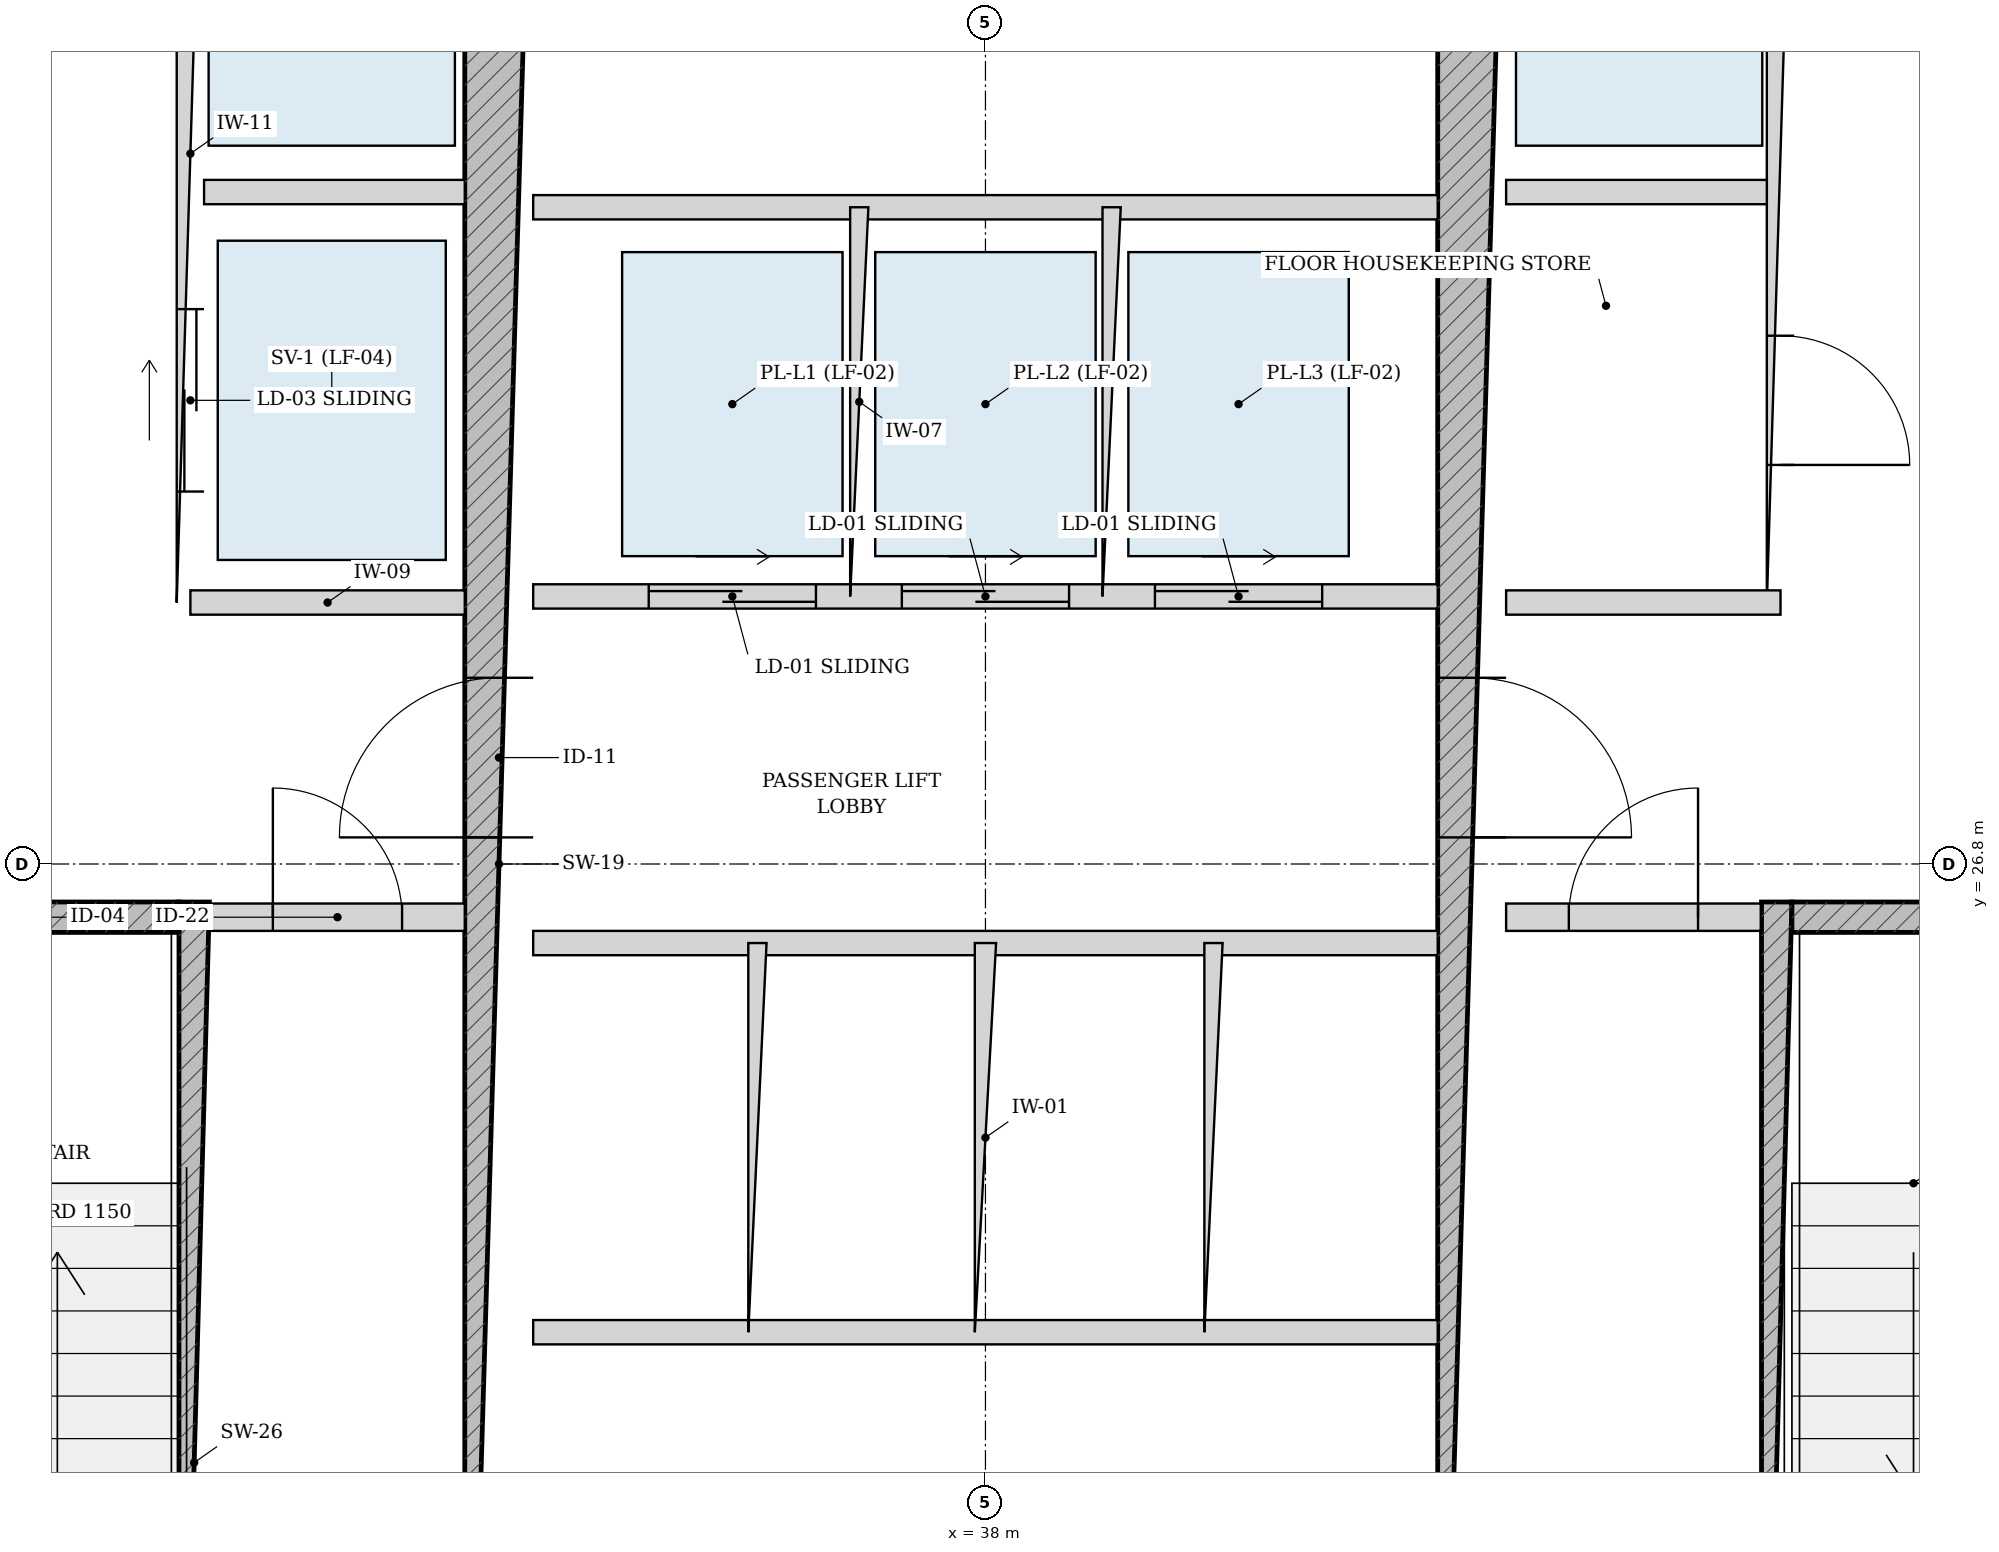
"""IFC4 building model, lengths in metres.
Left out: names, types, materials, properties, quantities, classifications, styles, units other than length and angle.
Written with IfcOpenShell. Run it as: python <this file> out.ifc"""

import sys

from ifc_helpers import new_model, si_unit, direction, frame, frame_2d, origin, place, context, subcontext, project, spatial, rectangle, extrude, source, transform, mapped, element, fill, save


model = new_model("IFC4")
c1 = context("Model", 3, precision=1e-05, world=origin(), true_north=direction((-0.2419218956, 0.970295726276)))
c2 = subcontext(c1, "Body", "Model", "MODEL_VIEW")
j1 = project(units=[si_unit("LENGTHUNIT", "METRE"), si_unit("PLANEANGLEUNIT", "RADIAN")], contexts=[c1])
p1 = place(None, origin())
s1 = spatial("IfcSite", under=j1, at=p1, CompositionType="ELEMENT")
p2 = place(p1, origin())
s2 = spatial("IfcBuilding", under=s1, at=p2, CompositionType="ELEMENT")
p3 = place(p2, frame((0.0, 0.0, 123.0)))
s3 = spatial("IfcBuildingStorey", under=s2, at=p3, CompositionType="ELEMENT", Elevation=123.0)
p4 = place(p3, frame((32.795, 19.175, 0.0), z_axis=(0.0, 0.0, 1.0), x_axis=(0.0, 1.0, 0.0)))
e1 = element("IfcWall", 1, at=p4, inside=s3, PredefinedType="SOLIDWALL", context=c2, shape_type="SweptSolid", body=[
    extrude(rectangle(XDim=7.375, YDim=0.2, at=frame_2d((3.688, 0.0))), origin(), (0.0, 0.0, 1.0), 3.325),
])
p5 = place(p3, frame((29.375, 26.45, 0.0), z_axis=(0.0, 0.0, 1.0), x_axis=(1.0, 0.0, 0.0)))
e2 = element("IfcWall", 2, at=p5, inside=s3, PredefinedType="SOLIDWALL", context=c2, shape_type="SweptSolid", body=[
    extrude(rectangle(XDim=3.32, YDim=0.2, at=frame_2d((1.66, 0.0))), origin(), (0.0, 0.0, 1.0), 3.325),
])
p6 = place(p5, frame((1.185, 0.0, 0.0)))
e3 = element("IfcOpeningElement", 3, at=p6, cuts=e2, PredefinedType="OPENING", context=c2, shape_type="SweptSolid", body=[
    extrude(rectangle(XDim=0.95, YDim=2.15, at=frame_2d((0.475, 1.075))), frame((0.0, 0.11, 0.0), z_axis=(0.0, -1.0, 0.0), x_axis=(1.0, 0.0, 0.0)), (0.0, 0.0, 1.0), 0.22),
])
p7 = place(p3, frame((43.205, 19.175, 0.0), z_axis=(0.0, 0.0, 1.0), x_axis=(0.0, 1.0, 0.0)))
e4 = element("IfcWall", 4, at=p7, inside=s3, PredefinedType="SOLIDWALL", context=c2, shape_type="SweptSolid", body=[
    extrude(rectangle(XDim=7.375, YDim=0.2, at=frame_2d((3.688, 0.0))), origin(), (0.0, 0.0, 1.0), 3.325),
])
p8 = place(p3, frame((43.305, 26.45, 0.0), z_axis=(0.0, 0.0, 1.0), x_axis=(1.0, 0.0, 0.0)))
e5 = element("IfcWall", 5, at=p8, inside=s3, PredefinedType="SOLIDWALL", context=c2, shape_type="SweptSolid", body=[
    extrude(rectangle(XDim=3.32, YDim=0.2, at=frame_2d((1.66, 0.0))), origin(), (0.0, 0.0, 1.0), 3.325),
])
p9 = place(p8, frame((1.185, 0.0, 0.0)))
e6 = element("IfcOpeningElement", 6, at=p9, cuts=e5, PredefinedType="OPENING", context=c2, shape_type="SweptSolid", body=[
    extrude(rectangle(XDim=0.95, YDim=2.15, at=frame_2d((0.475, 1.075))), frame((0.0, 0.11, 0.0), z_axis=(0.0, -1.0, 0.0), x_axis=(1.0, 0.0, 0.0)), (0.0, 0.0, 1.0), 0.22),
])
p10 = place(p3, frame((34.8, 19.175, 0.0), z_axis=(0.0, 0.0, 1.0), x_axis=(0.0, 1.0, 0.0)))
e7 = element("IfcWall", 7, at=p10, inside=s3, PredefinedType="SHEAR", context=c2, shape_type="SweptSolid", body=[
    extrude(rectangle(XDim=15.25, YDim=0.45, at=frame_2d((7.625, 0.0))), origin(), (0.0, 0.0, 1.0), 3.325),
])
p11 = place(p10, frame((7.8, 0.0, 0.0)))
e8 = element("IfcOpeningElement", 8, at=p11, cuts=e7, PredefinedType="OPENING", context=c2, shape_type="SweptSolid", body=[
    extrude(rectangle(XDim=1.05, YDim=2.15, at=frame_2d((0.525, 1.075))), frame((0.0, 0.235, 0.0), z_axis=(0.0, -1.0, 0.0), x_axis=(1.0, 0.0, 0.0)), (0.0, 0.0, 1.0), 0.47),
])
p12 = place(p3, frame((41.2, 19.175, 0.0), z_axis=(0.0, 0.0, 1.0), x_axis=(0.0, 1.0, 0.0)))
e9 = element("IfcWall", 9, at=p12, inside=s3, PredefinedType="SHEAR", context=c2, shape_type="SweptSolid", body=[
    extrude(rectangle(XDim=15.25, YDim=0.45, at=frame_2d((7.625, 0.0))), origin(), (0.0, 0.0, 1.0), 3.325),
])
p13 = place(p12, frame((7.8, 0.0, 0.0)))
e10 = element("IfcOpeningElement", 10, at=p13, cuts=e9, PredefinedType="OPENING", context=c2, shape_type="SweptSolid", body=[
    extrude(rectangle(XDim=1.05, YDim=2.15, at=frame_2d((0.525, 1.075))), frame((0.0, 0.235, 0.0), z_axis=(0.0, -1.0, 0.0), x_axis=(1.0, 0.0, 0.0)), (0.0, 0.0, 1.0), 0.47),
])
p14 = place(p3, frame((32.9, 26.45, 0.0), z_axis=(0.0, 0.0, 1.0), x_axis=(1.0, 0.0, 0.0)))
e11 = element("IfcWall", 11, at=p14, inside=s3, PredefinedType="PARTITIONING", context=c2, shape_type="SweptSolid", body=[
    extrude(rectangle(XDim=1.675, YDim=0.18, at=frame_2d((0.837, 0.0))), origin(), (0.0, 0.0, 1.0), 3.325),
])
p15 = place(p14, frame((0.413, 0.0, 0.0)))
e12 = element("IfcOpeningElement", 12, at=p15, cuts=e11, PredefinedType="OPENING", context=c2, shape_type="SweptSolid", body=[
    extrude(rectangle(XDim=0.85, YDim=2.1, at=frame_2d((0.425, 1.05))), frame((0.0, 0.1, 0.0), z_axis=(0.0, -1.0, 0.0), x_axis=(1.0, 0.0, 0.0)), (0.0, 0.0, 1.0), 0.2),
])
p16 = place(p3, frame((41.425, 26.45, 0.0), z_axis=(0.0, 0.0, 1.0), x_axis=(1.0, 0.0, 0.0)))
e13 = element("IfcWall", 13, at=p16, inside=s3, PredefinedType="PARTITIONING", context=c2, shape_type="SweptSolid", body=[
    extrude(rectangle(XDim=1.675, YDim=0.18, at=frame_2d((0.837, 0.0))), origin(), (0.0, 0.0, 1.0), 3.325),
])
p17 = place(p16, frame((0.413, 0.0, 0.0)))
e14 = element("IfcOpeningElement", 14, at=p17, cuts=e13, PredefinedType="OPENING", context=c2, shape_type="SweptSolid", body=[
    extrude(rectangle(XDim=0.85, YDim=2.1, at=frame_2d((0.425, 1.05))), frame((0.0, 0.1, 0.0), z_axis=(0.0, -1.0, 0.0), x_axis=(1.0, 0.0, 0.0)), (0.0, 0.0, 1.0), 0.2),
])
p18 = place(p3, frame((32.77, 28.52, 0.0), z_axis=(0.0, 0.0, 1.0), x_axis=(0.0, 1.0, 0.0)))
e15 = element("IfcWall", 15, at=p18, inside=s3, PredefinedType="PARTITIONING", context=c2, shape_type="SweptSolid", body=[
    extrude(rectangle(XDim=5.905, YDim=0.18, at=frame_2d((2.953, 0.0))), origin(), (0.0, 0.0, 1.0), 3.325),
])
p19 = place(p18, frame((3.655, 0.0, 0.0)))
e16 = element("IfcOpeningElement", 16, at=p19, cuts=e15, PredefinedType="OPENING", context=c2, shape_type="SweptSolid", body=[
    extrude(rectangle(XDim=1.15, YDim=2.2, at=frame_2d((0.575, 1.1))), frame((0.0, 0.1, 0.0), z_axis=(0.0, -1.0, 0.0), x_axis=(1.0, 0.0, 0.0)), (0.0, 0.0, 1.0), 0.2),
])
p20 = place(p18, frame((0.73, 0.0, 0.0)))
e17 = element("IfcOpeningElement", 17, at=p20, cuts=e15, PredefinedType="OPENING", context=c2, shape_type="SweptSolid", body=[
    extrude(rectangle(XDim=1.2, YDim=2.25, at=frame_2d((0.6, 1.125))), frame((0.0, 0.1, 0.0), z_axis=(0.0, -1.0, 0.0), x_axis=(1.0, 0.0, 0.0)), (0.0, 0.0, 1.0), 0.2),
])
p21 = place(p3, frame((32.86, 31.22, 0.0), z_axis=(0.0, 0.0, 1.0), x_axis=(1.0, 0.0, 0.0)))
e18 = element("IfcWall", 18, at=p21, inside=s3, PredefinedType="PARTITIONING", context=c2, shape_type="SweptSolid", body=[
    extrude(rectangle(XDim=1.715, YDim=0.16, at=frame_2d((0.857, 0.0))), origin(), (0.0, 0.0, 1.0), 3.325),
])
p22 = place(p3, frame((32.77, 28.52, 0.0), z_axis=(0.0, 0.0, 1.0), x_axis=(1.0, 0.0, 0.0)))
e19 = element("IfcWall", 19, at=p22, inside=s3, PredefinedType="PARTITIONING", context=c2, shape_type="SweptSolid", body=[
    extrude(rectangle(XDim=1.805, YDim=0.16, at=frame_2d((0.902, 0.0))), origin(), (0.0, 0.0, 1.0), 3.325),
])
p23 = place(p3, frame((43.23, 28.52, 0.0), z_axis=(0.0, 0.0, 1.0), x_axis=(0.0, 1.0, 0.0)))
e20 = element("IfcWall", 20, at=p23, inside=s3, PredefinedType="PARTITIONING", context=c2, shape_type="SweptSolid", body=[
    extrude(rectangle(XDim=5.905, YDim=0.18, at=frame_2d((2.953, 0.0))), origin(), (0.0, 0.0, 1.0), 3.325),
])
p24 = place(p23, frame((0.905, 0.0, 0.0)))
e21 = element("IfcOpeningElement", 21, at=p24, cuts=e20, PredefinedType="OPENING", context=c2, shape_type="SweptSolid", body=[
    extrude(rectangle(XDim=0.85, YDim=2.1, at=frame_2d((0.425, 1.05))), frame((0.0, 0.1, 0.0), z_axis=(0.0, -1.0, 0.0), x_axis=(1.0, 0.0, 0.0)), (0.0, 0.0, 1.0), 0.2),
])
p25 = place(p23, frame((3.655, 0.0, 0.0)))
e22 = element("IfcOpeningElement", 22, at=p25, cuts=e20, PredefinedType="OPENING", context=c2, shape_type="SweptSolid", body=[
    extrude(rectangle(XDim=1.15, YDim=2.2, at=frame_2d((0.575, 1.1))), frame((0.0, 0.1, 0.0), z_axis=(0.0, -1.0, 0.0), x_axis=(1.0, 0.0, 0.0)), (0.0, 0.0, 1.0), 0.2),
])
p26 = place(p3, frame((41.425, 31.22, 0.0), z_axis=(0.0, 0.0, 1.0), x_axis=(1.0, 0.0, 0.0)))
e23 = element("IfcWall", 23, at=p26, inside=s3, PredefinedType="PARTITIONING", context=c2, shape_type="SweptSolid", body=[
    extrude(rectangle(XDim=1.715, YDim=0.16, at=frame_2d((0.857, 0.0))), origin(), (0.0, 0.0, 1.0), 3.325),
])
p27 = place(p3, frame((41.425, 28.52, 0.0), z_axis=(0.0, 0.0, 1.0), x_axis=(1.0, 0.0, 0.0)))
e24 = element("IfcWall", 24, at=p27, inside=s3, PredefinedType="PARTITIONING", context=c2, shape_type="SweptSolid", body=[
    extrude(rectangle(XDim=1.805, YDim=0.16, at=frame_2d((0.902, 0.0))), origin(), (0.0, 0.0, 1.0), 3.325),
])
p28 = place(p3, frame((35.025, 28.56, 0.0), z_axis=(0.0, 0.0, 1.0), x_axis=(1.0, 0.0, 0.0)))
e25 = element("IfcWall", 25, at=p28, inside=s3, PredefinedType="PARTITIONING", context=c2, shape_type="SweptSolid", body=[
    extrude(rectangle(XDim=5.95, YDim=0.16, at=frame_2d((2.975, 0.0))), origin(), (0.0, 0.0, 1.0), 3.325),
])
p29 = place(p28, frame((0.76, 0.0, 0.0)))
e26 = element("IfcOpeningElement", 26, at=p29, cuts=e25, PredefinedType="OPENING", context=c2, shape_type="SweptSolid", body=[
    extrude(rectangle(XDim=1.1, YDim=2.2, at=frame_2d((0.55, 1.1))), frame((0.0, 0.09, 0.0), z_axis=(0.0, -1.0, 0.0), x_axis=(1.0, 0.0, 0.0)), (0.0, 0.0, 1.0), 0.18),
])
p30 = place(p28, frame((2.425, 0.0, 0.0)))
e27 = element("IfcOpeningElement", 27, at=p30, cuts=e25, PredefinedType="OPENING", context=c2, shape_type="SweptSolid", body=[
    extrude(rectangle(XDim=1.1, YDim=2.2, at=frame_2d((0.55, 1.1))), frame((0.0, 0.09, 0.0), z_axis=(0.0, -1.0, 0.0), x_axis=(1.0, 0.0, 0.0)), (0.0, 0.0, 1.0), 0.18),
])
p31 = place(p28, frame((4.09, 0.0, 0.0)))
e28 = element("IfcOpeningElement", 28, at=p31, cuts=e25, PredefinedType="OPENING", context=c2, shape_type="SweptSolid", body=[
    extrude(rectangle(XDim=1.1, YDim=2.2, at=frame_2d((0.55, 1.1))), frame((0.0, 0.09, 0.0), z_axis=(0.0, -1.0, 0.0), x_axis=(1.0, 0.0, 0.0)), (0.0, 0.0, 1.0), 0.18),
])
p32 = place(p3, frame((35.025, 31.12, 0.0), z_axis=(0.0, 0.0, 1.0), x_axis=(1.0, 0.0, 0.0)))
e29 = element("IfcWall", 29, at=p32, inside=s3, PredefinedType="PARTITIONING", context=c2, shape_type="SweptSolid", body=[
    extrude(rectangle(XDim=5.95, YDim=0.16, at=frame_2d((2.975, 0.0))), origin(), (0.0, 0.0, 1.0), 3.325),
])
for number, where, z_axis, x_axis in (
    (30, (37.17, 28.56, 0.0), (0.0, 0.0, 1.0), (0.0, 1.0, 0.0)),
    (31, (38.83, 28.56, 0.0), (0.0, 0.0, 1.0), (0.0, 1.0, 0.0)),
):
    element("IfcWall", number, at=place(p3, frame(where, z_axis=z_axis, x_axis=x_axis)), inside=s3, PredefinedType="PARTITIONING", context=c2, shape_type="SweptSolid", body=[
        extrude(rectangle(XDim=2.56, YDim=0.12, at=frame_2d((1.28, 0.0))), origin(), (0.0, 0.0, 1.0), 3.325),
    ])
for number, where, z_axis, x_axis in (
    (32, (35.025, 26.28, 0.0), (0.0, 0.0, 1.0), (1.0, 0.0, 0.0)),
    (33, (35.025, 23.72, 0.0), (0.0, 0.0, 1.0), (1.0, 0.0, 0.0)),
):
    element("IfcWall", number, at=place(p3, frame(where, z_axis=z_axis, x_axis=x_axis)), inside=s3, PredefinedType="PARTITIONING", context=c2, shape_type="SweptSolid", body=[
        extrude(rectangle(XDim=5.95, YDim=0.16, at=frame_2d((2.975, 0.0))), origin(), (0.0, 0.0, 1.0), 3.325),
    ])
p33 = place(p3, frame((36.5, 23.72, 0.0), z_axis=(0.0, 0.0, 1.0), x_axis=(0.0, 1.0, 0.0)))
e34 = element("IfcWall", 34, at=p33, inside=s3, PredefinedType="PARTITIONING", context=c2, shape_type="SweptSolid", body=[
    extrude(rectangle(XDim=2.56, YDim=0.12, at=frame_2d((1.28, 0.0))), origin(), (0.0, 0.0, 1.0), 3.325),
])
p34 = place(p3, frame((38.0, 23.72, 0.0), z_axis=(0.0, 0.0, 1.0), x_axis=(0.0, 1.0, 0.0)))
e35 = element("IfcWall", 35, at=p34, inside=s3, PredefinedType="PARTITIONING", context=c2, shape_type="SweptSolid", body=[
    extrude(rectangle(XDim=2.56, YDim=0.14, at=frame_2d((1.28, 0.0))), origin(), (0.0, 0.0, 1.0), 3.325),
])
p35 = place(p3, frame((39.5, 23.72, 0.0), z_axis=(0.0, 0.0, 1.0), x_axis=(0.0, 1.0, 0.0)))
e36 = element("IfcWall", 36, at=p35, inside=s3, PredefinedType="PARTITIONING", context=c2, shape_type="SweptSolid", body=[
    extrude(rectangle(XDim=2.56, YDim=0.12, at=frame_2d((1.28, 0.0))), origin(), (0.0, 0.0, 1.0), 3.325),
])
m1 = source(origin(), c2, "Body", "SweptSolid", [
    extrude(rectangle(XDim=1.05, YDim=2.15, at=frame_2d((0.525, 1.075))), frame((0.0, 0.025, 0.0), z_axis=(0.0, -1.0, 0.0), x_axis=(1.0, 0.0, 0.0)), (0.0, 0.0, 1.0), 0.05),
])
p36 = place(p11, origin())
e37 = element("IfcDoor", 37, at=p36, inside=s3, OperationType="SINGLE_SWING_LEFT", PredefinedType="DOOR", context=c2, shape_type="MappedRepresentation", body=[
    mapped(m1, transform((0.0, 0.0, 0.0), scale=1.0)),
])
fill(e8, e37)
p37 = place(p13, frame((1.05, 0.0, 0.0), z_axis=(0.0, 0.0, 1.0), x_axis=(-1.0, 0.0, 0.0)))
e38 = element("IfcDoor", 38, at=p37, inside=s3, OperationType="SINGLE_SWING_RIGHT", PredefinedType="DOOR", context=c2, shape_type="MappedRepresentation", body=[
    mapped(m1, transform((0.0, 0.0, 0.0), scale=1.0)),
])
fill(e10, e38)
m2 = source(origin(), c2, "Body", "SweptSolid", [
    extrude(rectangle(XDim=0.85, YDim=2.1, at=frame_2d((0.425, 1.05))), frame((0.0, 0.025, 0.0), z_axis=(0.0, -1.0, 0.0), x_axis=(1.0, 0.0, 0.0)), (0.0, 0.0, 1.0), 0.05),
])
p38 = place(p15, origin())
e39 = element("IfcDoor", 39, at=p38, inside=s3, OperationType="SINGLE_SWING_LEFT", PredefinedType="DOOR", context=c2, shape_type="MappedRepresentation", body=[
    mapped(m2, transform((0.0, 0.0, 0.0), scale=1.0)),
])
fill(e12, e39)
p39 = place(p17, origin())
e40 = element("IfcDoor", 40, at=p39, inside=s3, OperationType="SINGLE_SWING_RIGHT", PredefinedType="DOOR", context=c2, shape_type="MappedRepresentation", body=[
    mapped(m2, transform((0.0, 0.0, 0.0), scale=1.0)),
])
fill(e14, e40)
p40 = place(p24, frame((0.85, 0.0, 0.0), z_axis=(0.0, 0.0, 1.0), x_axis=(-1.0, 0.0, 0.0)))
e41 = element("IfcDoor", 41, at=p40, inside=s3, OperationType="SINGLE_SWING_RIGHT", PredefinedType="DOOR", context=c2, shape_type="MappedRepresentation", body=[
    mapped(m2, transform((0.0, 0.0, 0.0), scale=1.0)),
])
fill(e21, e41)
m3 = source(origin(), c2, "Body", "SweptSolid", [
    extrude(rectangle(XDim=1.2, YDim=2.25, at=frame_2d((0.6, 1.125))), frame((0.0, 0.025, 0.0), z_axis=(0.0, -1.0, 0.0), x_axis=(1.0, 0.0, 0.0)), (0.0, 0.0, 1.0), 0.05),
])
p41 = place(p20, origin())
e42 = element("IfcDoor", 42, at=p41, inside=s3, OperationType="DOUBLE_DOOR_SLIDING", PredefinedType="DOOR", context=c2, shape_type="MappedRepresentation", body=[
    mapped(m3, transform((0.0, 0.0, 0.0), scale=1.0)),
])
fill(e17, e42)
m4 = source(origin(), c2, "Body", "SweptSolid", [
    extrude(rectangle(XDim=1.1, YDim=2.2, at=frame_2d((0.55, 1.1))), frame((0.0, 0.025, 0.0), z_axis=(0.0, -1.0, 0.0), x_axis=(1.0, 0.0, 0.0)), (0.0, 0.0, 1.0), 0.05),
])
p42 = place(p29, origin())
e43 = element("IfcDoor", 43, at=p42, inside=s3, OperationType="DOUBLE_DOOR_SLIDING", PredefinedType="DOOR", context=c2, shape_type="MappedRepresentation", body=[
    mapped(m4, transform((0.0, 0.0, 0.0), scale=1.0)),
])
fill(e26, e43)
p43 = place(p30, origin())
e44 = element("IfcDoor", 44, at=p43, inside=s3, OperationType="DOUBLE_DOOR_SLIDING", PredefinedType="DOOR", context=c2, shape_type="MappedRepresentation", body=[
    mapped(m4, transform((0.0, 0.0, 0.0), scale=1.0)),
])
fill(e27, e44)
p44 = place(p31, origin())
e45 = element("IfcDoor", 45, at=p44, inside=s3, OperationType="DOUBLE_DOOR_SLIDING", PredefinedType="DOOR", context=c2, shape_type="MappedRepresentation", body=[
    mapped(m4, transform((0.0, 0.0, 0.0), scale=1.0)),
])
fill(e28, e45)
save(model, sys.argv[1])
